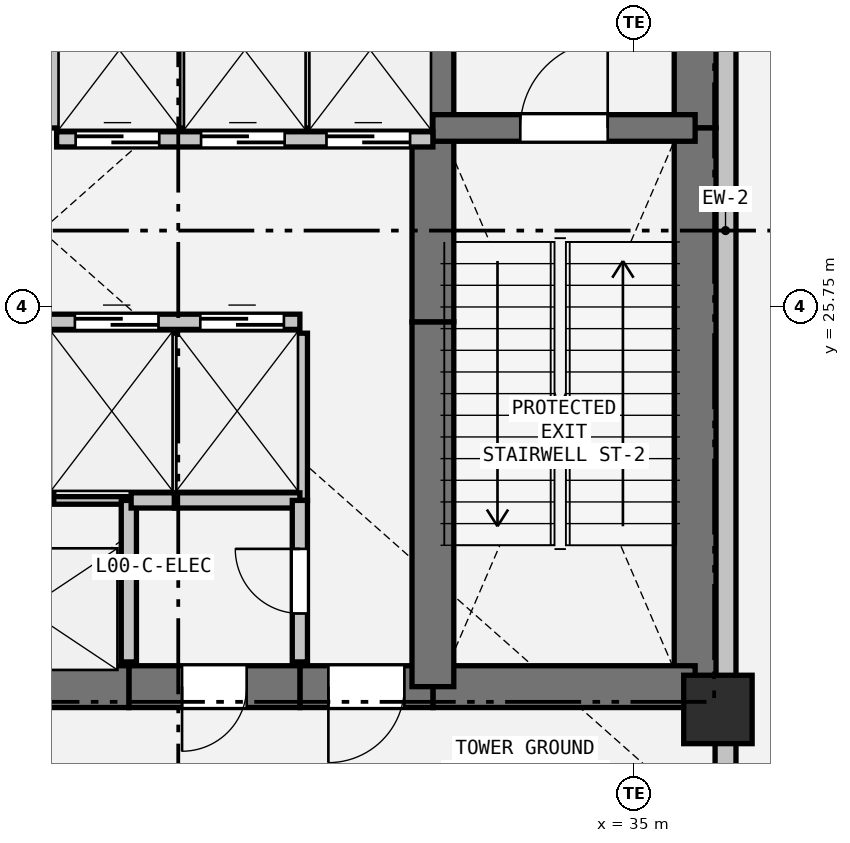
"""IFC4 building model, lengths in metres.
Left out: names, types, materials, properties, quantities, classifications, styles, units other than length and angle.
Written with IfcOpenShell. Run it as: python <this file> out.ifc"""

import sys

from ifc_helpers import new_model, si_unit, direction, frame, frame_2d, origin, origin_2d, place, context, subcontext, project, spatial, rectangle, extrude, element, fill, save


model = new_model("IFC4")
c1 = context("Model", 3, precision=1e-05, world=origin(), true_north=direction((0.0, 1.0)))
c2 = subcontext(c1, "Body", "Model", "MODEL_VIEW")
j1 = project(units=[si_unit("LENGTHUNIT", "METRE"), si_unit("PLANEANGLEUNIT", "RADIAN")], contexts=[c1])
p1 = place(None, origin())
s1 = spatial("IfcSite", under=j1, at=p1, CompositionType="ELEMENT")
p2 = place(p1, origin())
s2 = spatial("IfcBuilding", under=s1, at=p2, CompositionType="ELEMENT")
p3 = place(p2, origin())
s3 = spatial("IfcBuildingStorey", under=s2, at=p3, CompositionType="ELEMENT", Elevation=0.0)
p4 = place(p3, frame((36.1, 20.45, 0.0), z_axis=(0.0, 0.0, 1.0), x_axis=(1.0, 0.0, 0.0)))
e1 = element("IfcColumn", 1, at=p4, inside=s3, PredefinedType="COLUMN", context=c2, shape_type="SweptSolid", body=[
    extrude(rectangle(XDim=0.9, YDim=0.9, at=origin_2d()), origin(), (0.0, 0.0, 1.0), 5.1),
])
p5 = place(p3, frame((36.2, 34.7, 0.0), z_axis=(0.0, 0.0, 1.0), x_axis=(0.0, -1.0, 0.0)))
e2 = element("IfcWall", 2, at=p5, inside=s3, PredefinedType="SOLIDWALL", context=c2, shape_type="SweptSolid", body=[
    extrude(rectangle(XDim=15.9, YDim=0.275, at=frame_2d((7.95, 0.0))), origin(), (0.0, 0.0, 1.0), 3.185),
])
p6 = place(p3, frame((35.8, 32.75, 0.0), z_axis=(0.0, 0.0, 1.0), x_axis=(0.0, -1.0, 0.0)))
e3 = element("IfcWall", 3, at=p6, inside=s3, PredefinedType="SHEAR", context=c2, shape_type="SweptSolid", body=[
    extrude(rectangle(XDim=4.65, YDim=0.55, at=frame_2d((2.325, 0.0))), origin(), (0.0, 0.0, 1.0), 4.8),
])
p7 = place(p3, frame((35.8, 28.1, 0.0), z_axis=(0.0, 0.0, 1.0), x_axis=(0.0, -1.0, 0.0)))
e4 = element("IfcWall", 4, at=p7, inside=s3, PredefinedType="SHEAR", context=c2, shape_type="SweptSolid", body=[
    extrude(rectangle(XDim=7.35, YDim=0.55, at=frame_2d((3.675, 0.0))), origin(), (0.0, 0.0, 1.0), 4.8),
])
p8 = place(p3, frame((35.8, 20.75, 0.0), z_axis=(0.0, 0.0, 1.0), x_axis=(-1.0, 0.0, 0.0)))
e5 = element("IfcWall", 5, at=p8, inside=s3, PredefinedType="SHEAR", context=c2, shape_type="SweptSolid", body=[
    extrude(rectangle(XDim=3.45, YDim=0.55, at=frame_2d((1.725, 0.0))), origin(), (0.0, 0.0, 1.0), 4.8),
])
p9 = place(p3, frame((32.35, 20.75, 0.0), z_axis=(0.0, 0.0, 1.0), x_axis=(-1.0, 0.0, 0.0)))
e6 = element("IfcWall", 6, at=p9, inside=s3, PredefinedType="SHEAR", context=c2, shape_type="SweptSolid", body=[
    extrude(rectangle(XDim=1.75, YDim=0.55, at=frame_2d((0.875, 0.0))), origin(), (0.0, 0.0, 1.0), 4.8),
])
p10 = place(p9, frame((0.375, 0.0, 0.0)))
e7 = element("IfcOpeningElement", 7, at=p10, cuts=e6, PredefinedType="OPENING", context=c2, shape_type="SweptSolid", body=[
    extrude(rectangle(XDim=1.0, YDim=2.15, at=frame_2d((0.5, 1.075))), frame((0.0, 0.285, 0.0), z_axis=(0.0, -1.0, 0.0), x_axis=(1.0, 0.0, 0.0)), (0.0, 0.0, 1.0), 0.57),
])
p11 = place(p3, frame((30.6, 20.75, 0.0), z_axis=(0.0, 0.0, 1.0), x_axis=(-1.0, 0.0, 0.0)))
e8 = element("IfcWall", 8, at=p11, inside=s3, PredefinedType="SHEAR", context=c2, shape_type="SweptSolid", body=[
    extrude(rectangle(XDim=2.25, YDim=0.55, at=frame_2d((1.125, 0.0))), origin(), (0.0, 0.0, 1.0), 4.8),
])
p12 = place(p11, frame((0.7, 0.0, 0.0)))
e9 = element("IfcOpeningElement", 9, at=p12, cuts=e8, PredefinedType="OPENING", context=c2, shape_type="SweptSolid", body=[
    extrude(rectangle(XDim=0.85, YDim=2.1, at=frame_2d((0.425, 1.05))), frame((0.0, 0.285, 0.0), z_axis=(0.0, -1.0, 0.0), x_axis=(1.0, 0.0, 0.0)), (0.0, 0.0, 1.0), 0.57),
])
p13 = place(p3, frame((28.35, 20.75, 0.0), z_axis=(0.0, 0.0, 1.0), x_axis=(-1.0, 0.0, 0.0)))
e10 = element("IfcWall", 10, at=p13, inside=s3, PredefinedType="SHEAR", context=c2, shape_type="SweptSolid", body=[
    extrude(rectangle(XDim=2.7, YDim=0.55, at=frame_2d((1.35, 0.0))), origin(), (0.0, 0.0, 1.0), 4.8),
])
p14 = place(p3, frame((32.35, 20.75, 0.0), z_axis=(0.0, 0.0, 1.0), x_axis=(0.0, 1.0, 0.0)))
e11 = element("IfcWall", 11, at=p14, inside=s3, PredefinedType="SHEAR", context=c2, shape_type="SweptSolid", body=[
    extrude(rectangle(XDim=4.8, YDim=0.55, at=frame_2d((2.4, 0.0))), origin(), (0.0, 0.0, 1.0), 4.8),
])
p15 = place(p3, frame((32.35, 25.55, 0.0), z_axis=(0.0, 0.0, 1.0), x_axis=(0.0, 1.0, 0.0)))
e12 = element("IfcWall", 12, at=p15, inside=s3, PredefinedType="SHEAR", context=c2, shape_type="SweptSolid", body=[
    extrude(rectangle(XDim=2.4, YDim=0.55, at=frame_2d((1.2, 0.0))), origin(), (0.0, 0.0, 1.0), 4.8),
])
p16 = place(p3, frame((32.35, 27.95, 0.0), z_axis=(0.0, 0.0, 1.0), x_axis=(0.0, 1.0, 0.0)))
e13 = element("IfcWall", 13, at=p16, inside=s3, PredefinedType="SHEAR", context=c2, shape_type="SweptSolid", body=[
    extrude(rectangle(XDim=2.8, YDim=0.55, at=frame_2d((1.4, 0.0))), origin(), (0.0, 0.0, 1.0), 4.8),
])
p17 = place(p3, frame((32.35, 28.1, 0.0), z_axis=(0.0, 0.0, 1.0), x_axis=(1.0, 0.0, 0.0)))
e14 = element("IfcWall", 14, at=p17, inside=s3, PredefinedType="SHEAR", context=c2, shape_type="SweptSolid", body=[
    extrude(rectangle(XDim=3.45, YDim=0.35, at=frame_2d((1.725, 0.0))), origin(), (0.0, 0.0, 1.0), 4.8),
])
p18 = place(p17, frame((1.15, 0.0, 0.0)))
e15 = element("IfcOpeningElement", 15, at=p18, cuts=e14, PredefinedType="OPENING", context=c2, shape_type="SweptSolid", body=[
    extrude(rectangle(XDim=1.15, YDim=2.15, at=frame_2d((0.575, 1.075))), frame((0.0, 0.185, 0.0), z_axis=(0.0, -1.0, 0.0), x_axis=(1.0, 0.0, 0.0)), (0.0, 0.0, 1.0), 0.37),
])
p19 = place(p3, frame((25.65, 25.55, 0.0), z_axis=(0.0, 0.0, 1.0), x_axis=(1.0, 0.0, 0.0)))
e16 = element("IfcWall", 16, at=p19, inside=s3, PredefinedType="PARTITIONING", context=c2, shape_type="SweptSolid", body=[
    extrude(rectangle(XDim=4.95, YDim=0.2, at=frame_2d((2.475, 0.0))), origin(), (0.0, 0.0, 1.0), 4.8),
])
p20 = place(p19, frame((0.34, 0.0, 0.0)))
e17 = element("IfcOpeningElement", 17, at=p20, cuts=e16, PredefinedType="OPENING", context=c2, shape_type="SweptSolid", body=[
    extrude(rectangle(XDim=1.1, YDim=2.15, at=frame_2d((0.55, 1.075))), frame((0.0, 0.11, 0.0), z_axis=(0.0, -1.0, 0.0), x_axis=(1.0, 0.0, 0.0)), (0.0, 0.0, 1.0), 0.22),
])
p21 = place(p19, frame((1.99, 0.0, 0.0)))
e18 = element("IfcOpeningElement", 18, at=p21, cuts=e16, PredefinedType="OPENING", context=c2, shape_type="SweptSolid", body=[
    extrude(rectangle(XDim=1.1, YDim=2.15, at=frame_2d((0.55, 1.075))), frame((0.0, 0.11, 0.0), z_axis=(0.0, -1.0, 0.0), x_axis=(1.0, 0.0, 0.0)), (0.0, 0.0, 1.0), 0.22),
])
p22 = place(p19, frame((3.64, 0.0, 0.0)))
e19 = element("IfcOpeningElement", 19, at=p22, cuts=e16, PredefinedType="OPENING", context=c2, shape_type="SweptSolid", body=[
    extrude(rectangle(XDim=1.1, YDim=2.15, at=frame_2d((0.55, 1.075))), frame((0.0, 0.11, 0.0), z_axis=(0.0, -1.0, 0.0), x_axis=(1.0, 0.0, 0.0)), (0.0, 0.0, 1.0), 0.22),
])
p23 = place(p3, frame((27.4, 27.95, 0.0), z_axis=(0.0, 0.0, 1.0), x_axis=(1.0, 0.0, 0.0)))
e20 = element("IfcWall", 20, at=p23, inside=s3, PredefinedType="PARTITIONING", context=c2, shape_type="SweptSolid", body=[
    extrude(rectangle(XDim=4.95, YDim=0.2, at=frame_2d((2.475, 0.0))), origin(), (0.0, 0.0, 1.0), 4.8),
])
p24 = place(p23, frame((0.25, 0.0, 0.0)))
e21 = element("IfcOpeningElement", 21, at=p24, cuts=e20, PredefinedType="OPENING", context=c2, shape_type="SweptSolid", body=[
    extrude(rectangle(XDim=1.1, YDim=2.15, at=frame_2d((0.55, 1.075))), frame((0.0, 0.11, 0.0), z_axis=(0.0, -1.0, 0.0), x_axis=(1.0, 0.0, 0.0)), (0.0, 0.0, 1.0), 0.22),
])
p25 = place(p23, frame((1.9, 0.0, 0.0)))
e22 = element("IfcOpeningElement", 22, at=p25, cuts=e20, PredefinedType="OPENING", context=c2, shape_type="SweptSolid", body=[
    extrude(rectangle(XDim=1.1, YDim=2.15, at=frame_2d((0.55, 1.075))), frame((0.0, 0.11, 0.0), z_axis=(0.0, -1.0, 0.0), x_axis=(1.0, 0.0, 0.0)), (0.0, 0.0, 1.0), 0.22),
])
p26 = place(p23, frame((3.55, 0.0, 0.0)))
e23 = element("IfcOpeningElement", 23, at=p26, cuts=e20, PredefinedType="OPENING", context=c2, shape_type="SweptSolid", body=[
    extrude(rectangle(XDim=1.1, YDim=2.15, at=frame_2d((0.55, 1.075))), frame((0.0, 0.11, 0.0), z_axis=(0.0, -1.0, 0.0), x_axis=(1.0, 0.0, 0.0)), (0.0, 0.0, 1.0), 0.22),
])
p27 = place(p3, frame((27.3, 23.2, 0.0), z_axis=(0.0, 0.0, 1.0), x_axis=(1.0, 0.0, 0.0)))
e24 = element("IfcWall", 24, at=p27, inside=s3, PredefinedType="PARTITIONING", context=c2, shape_type="SweptSolid", body=[
    extrude(rectangle(XDim=1.05, YDim=0.1, at=frame_2d((0.525, 0.0))), origin(), (0.0, 0.0, 1.0), 4.8),
])
p28 = place(p3, frame((28.35, 23.2, 0.0), z_axis=(0.0, 0.0, 1.0), x_axis=(0.0, -1.0, 0.0)))
e25 = element("IfcWall", 25, at=p28, inside=s3, PredefinedType="PARTITIONING", context=c2, shape_type="SweptSolid", body=[
    extrude(rectangle(XDim=2.125, YDim=0.2, at=frame_2d((1.062, 0.0))), origin(), (0.0, 0.0, 1.0), 4.8),
])
p29 = place(p3, frame((27.3, 25.4, 0.0), z_axis=(0.0, 0.0, 1.0), x_axis=(0.0, -1.0, 0.0)))
e26 = element("IfcWall", 26, at=p29, inside=s3, PredefinedType="PARTITIONING", context=c2, shape_type="SweptSolid", body=[
    extrude(rectangle(XDim=2.2, YDim=0.125, at=frame_2d((1.1, 0.0))), origin(), (0.0, 0.0, 1.0), 4.8),
])
p30 = place(p3, frame((28.95, 25.4, 0.0), z_axis=(0.0, 0.0, 1.0), x_axis=(0.0, -1.0, 0.0)))
e27 = element("IfcWall", 27, at=p30, inside=s3, PredefinedType="PARTITIONING", context=c2, shape_type="SweptSolid", body=[
    extrude(rectangle(XDim=2.2, YDim=0.1, at=frame_2d((1.1, 0.0))), origin(), (0.0, 0.0, 1.0), 4.8),
])
p31 = place(p3, frame((28.95, 23.2, 0.0), z_axis=(0.0, 0.0, 1.0), x_axis=(-1.0, 0.0, 0.0)))
e28 = element("IfcWall", 28, at=p31, inside=s3, PredefinedType="PARTITIONING", context=c2, shape_type="SweptSolid", body=[
    extrude(rectangle(XDim=0.57, YDim=0.2, at=frame_2d((0.285, 0.0))), origin(), (0.0, 0.0, 1.0), 4.8),
])
p32 = place(p3, frame((30.6, 25.4, 0.0), z_axis=(0.0, 0.0, 1.0), x_axis=(0.0, -1.0, 0.0)))
e29 = element("IfcWall", 29, at=p32, inside=s3, PredefinedType="PARTITIONING", context=c2, shape_type="SweptSolid", body=[
    extrude(rectangle(XDim=2.2, YDim=0.2, at=frame_2d((1.1, 0.0))), origin(), (0.0, 0.0, 1.0), 4.8),
])
p33 = place(p3, frame((30.6, 23.2, 0.0), z_axis=(0.0, 0.0, 1.0), x_axis=(-1.0, 0.0, 0.0)))
e30 = element("IfcWall", 30, at=p33, inside=s3, PredefinedType="PARTITIONING", context=c2, shape_type="SweptSolid", body=[
    extrude(rectangle(XDim=1.65, YDim=0.2, at=frame_2d((0.825, 0.0))), origin(), (0.0, 0.0, 1.0), 4.8),
])
p34 = place(p3, frame((29.05, 30.3, 0.0), z_axis=(0.0, 0.0, 1.0), x_axis=(0.0, -1.0, 0.0)))
e31 = element("IfcWall", 31, at=p34, inside=s3, PredefinedType="PARTITIONING", context=c2, shape_type="SweptSolid", body=[
    extrude(rectangle(XDim=2.2, YDim=0.125, at=frame_2d((1.1, 0.0))), origin(), (0.0, 0.0, 1.0), 4.8),
])
p35 = place(p3, frame((27.4, 28.1, 0.0), z_axis=(0.0, 0.0, 1.0), x_axis=(0.0, 1.0, 0.0)))
e32 = element("IfcWall", 32, at=p35, inside=s3, PredefinedType="PARTITIONING", context=c2, shape_type="SweptSolid", body=[
    extrude(rectangle(XDim=2.2, YDim=0.2, at=frame_2d((1.1, 0.0))), origin(), (0.0, 0.0, 1.0), 4.8),
])
p36 = place(p3, frame((30.7, 30.3, 0.0), z_axis=(0.0, 0.0, 1.0), x_axis=(0.0, -1.0, 0.0)))
e33 = element("IfcWall", 33, at=p36, inside=s3, PredefinedType="PARTITIONING", context=c2, shape_type="SweptSolid", body=[
    extrude(rectangle(XDim=2.2, YDim=0.1, at=frame_2d((1.1, 0.0))), origin(), (0.0, 0.0, 1.0), 4.8),
])
p37 = place(p3, frame((30.6, 21.075, 0.0), z_axis=(0.0, 0.0, 1.0), x_axis=(0.0, 1.0, 0.0)))
e34 = element("IfcWall", 34, at=p37, inside=s3, PredefinedType="PARTITIONING", context=c2, shape_type="SweptSolid", body=[
    extrude(rectangle(XDim=2.125, YDim=0.2, at=frame_2d((1.062, 0.0))), origin(), (0.0, 0.0, 1.0), 4.8),
])
p38 = place(p37, frame((0.637, 0.0, 0.0)))
e35 = element("IfcOpeningElement", 35, at=p38, cuts=e34, PredefinedType="OPENING", context=c2, shape_type="SweptSolid", body=[
    extrude(rectangle(XDim=0.85, YDim=2.1, at=frame_2d((0.425, 1.05))), frame((0.0, 0.11, 0.0), z_axis=(0.0, -1.0, 0.0), x_axis=(1.0, 0.0, 0.0)), (0.0, 0.0, 1.0), 0.22),
])
p39 = place(p21, origin())
e36 = element("IfcDoor", 36, at=p39, inside=s3, OperationType="SLIDING_TO_LEFT", PredefinedType="DOOR", context=c2, shape_type="SweptSolid", body=[
    extrude(rectangle(XDim=1.1, YDim=2.15, at=frame_2d((0.55, 1.075))), frame((0.0, 0.025, 0.0), z_axis=(0.0, -1.0, 0.0), x_axis=(1.0, 0.0, 0.0)), (0.0, 0.0, 1.0), 0.05),
])
fill(e18, e36)
p40 = place(p22, origin())
e37 = element("IfcDoor", 37, at=p40, inside=s3, OperationType="SLIDING_TO_LEFT", PredefinedType="DOOR", context=c2, shape_type="SweptSolid", body=[
    extrude(rectangle(XDim=1.1, YDim=2.15, at=frame_2d((0.55, 1.075))), frame((0.0, 0.025, 0.0), z_axis=(0.0, -1.0, 0.0), x_axis=(1.0, 0.0, 0.0)), (0.0, 0.0, 1.0), 0.05),
])
fill(e19, e37)
p41 = place(p24, origin())
e38 = element("IfcDoor", 38, at=p41, inside=s3, OperationType="SLIDING_TO_LEFT", PredefinedType="DOOR", context=c2, shape_type="SweptSolid", body=[
    extrude(rectangle(XDim=1.1, YDim=2.15, at=frame_2d((0.55, 1.075))), frame((0.0, 0.025, 0.0), z_axis=(0.0, -1.0, 0.0), x_axis=(1.0, 0.0, 0.0)), (0.0, 0.0, 1.0), 0.05),
])
fill(e21, e38)
p42 = place(p25, origin())
e39 = element("IfcDoor", 39, at=p42, inside=s3, OperationType="SLIDING_TO_LEFT", PredefinedType="DOOR", context=c2, shape_type="SweptSolid", body=[
    extrude(rectangle(XDim=1.1, YDim=2.15, at=frame_2d((0.55, 1.075))), frame((0.0, 0.025, 0.0), z_axis=(0.0, -1.0, 0.0), x_axis=(1.0, 0.0, 0.0)), (0.0, 0.0, 1.0), 0.05),
])
fill(e22, e39)
p43 = place(p26, origin())
e40 = element("IfcDoor", 40, at=p43, inside=s3, OperationType="SLIDING_TO_LEFT", PredefinedType="DOOR", context=c2, shape_type="SweptSolid", body=[
    extrude(rectangle(XDim=1.1, YDim=2.15, at=frame_2d((0.55, 1.075))), frame((0.0, 0.025, 0.0), z_axis=(0.0, -1.0, 0.0), x_axis=(1.0, 0.0, 0.0)), (0.0, 0.0, 1.0), 0.05),
])
fill(e23, e40)
p44 = place(p10, origin())
e41 = element("IfcDoor", 41, at=p44, inside=s3, OperationType="SINGLE_SWING_RIGHT", PredefinedType="DOOR", context=c2, shape_type="SweptSolid", body=[
    extrude(rectangle(XDim=1.0, YDim=2.15, at=frame_2d((0.5, 1.075))), frame((0.0, 0.025, 0.0), z_axis=(0.0, -1.0, 0.0), x_axis=(1.0, 0.0, 0.0)), (0.0, 0.0, 1.0), 0.05),
])
fill(e7, e41)
p45 = place(p18, origin())
e42 = element("IfcDoor", 42, at=p45, inside=s3, OperationType="SINGLE_SWING_RIGHT", PredefinedType="DOOR", context=c2, shape_type="SweptSolid", body=[
    extrude(rectangle(XDim=1.15, YDim=2.15, at=frame_2d((0.575, 1.075))), frame((0.0, 0.025, 0.0), z_axis=(0.0, -1.0, 0.0), x_axis=(1.0, 0.0, 0.0)), (0.0, 0.0, 1.0), 0.05),
])
fill(e15, e42)
p46 = place(p38, origin())
e43 = element("IfcDoor", 43, at=p46, inside=s3, OperationType="SINGLE_SWING_RIGHT", PredefinedType="DOOR", context=c2, shape_type="SweptSolid", body=[
    extrude(rectangle(XDim=0.85, YDim=2.1, at=frame_2d((0.425, 1.05))), frame((0.0, 0.025, 0.0), z_axis=(0.0, -1.0, 0.0), x_axis=(1.0, 0.0, 0.0)), (0.0, 0.0, 1.0), 0.05),
])
fill(e35, e43)
p47 = place(p12, origin())
e44 = element("IfcDoor", 44, at=p47, inside=s3, OperationType="SINGLE_SWING_RIGHT", PredefinedType="DOOR", context=c2, shape_type="SweptSolid", body=[
    extrude(rectangle(XDim=0.85, YDim=2.1, at=frame_2d((0.425, 1.05))), frame((0.0, 0.025, 0.0), z_axis=(0.0, -1.0, 0.0), x_axis=(1.0, 0.0, 0.0)), (0.0, 0.0, 1.0), 0.05),
])
fill(e9, e44)
save(model, sys.argv[1])
